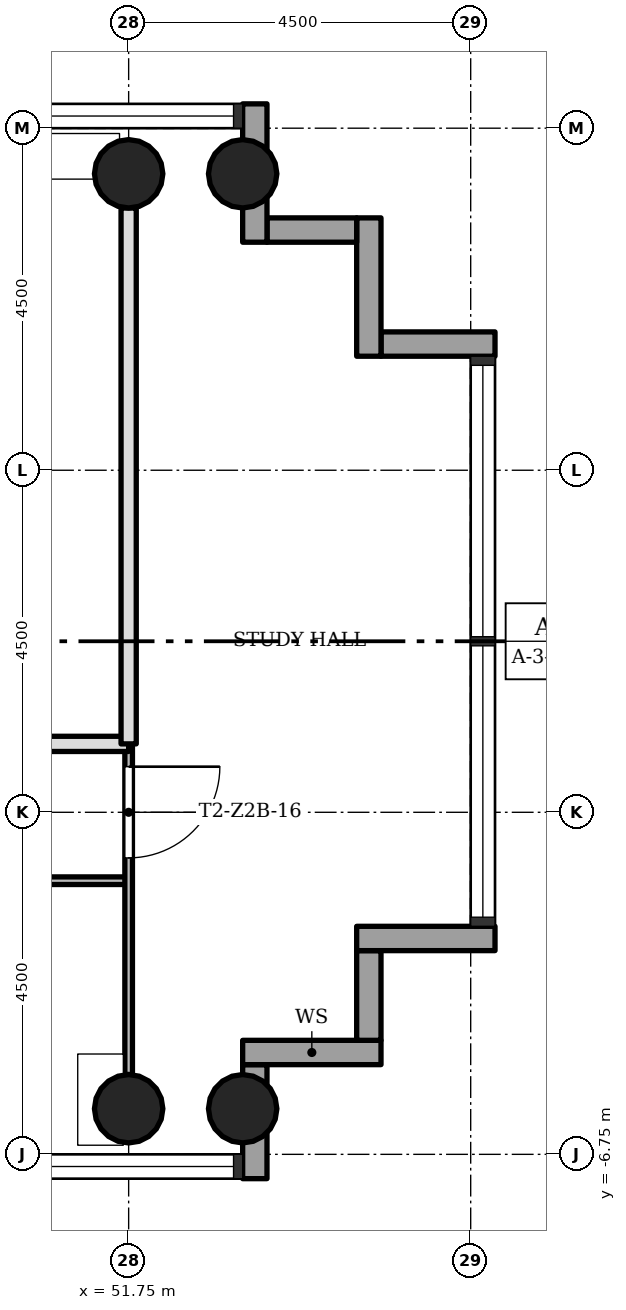
"""IFC4 building model, lengths in metres.
Left out: names, types, materials, properties, quantities, classifications, styles, units other than length and angle.
Written with IfcOpenShell. Run it as: python <this file> out.ifc"""

import sys

from ifc_helpers import new_model, si_unit, direction, frame, frame_2d, origin, origin_2d, place, context, subcontext, project, spatial, rectangle, hollow_circle, extrude, element, fill, save


model = new_model("IFC4")
c1 = context("Model", 3, precision=1e-05, world=origin(), true_north=direction((0.0, 1.0)))
c2 = subcontext(c1, "Body", "Model", "MODEL_VIEW")
j1 = project(units=[si_unit("LENGTHUNIT", "METRE"), si_unit("PLANEANGLEUNIT", "RADIAN")], contexts=[c1])
p1 = place(None, origin())
s1 = spatial("IfcSite", under=j1, at=p1, CompositionType="ELEMENT")
p2 = place(p1, origin())
s2 = spatial("IfcBuilding", under=s1, at=p2, CompositionType="ELEMENT")
p3 = place(p2, frame((0.0, 0.0, 76.6)))
s3 = spatial("IfcBuildingStorey", under=s2, at=p3, CompositionType="ELEMENT", Elevation=76.6)
for number, where, z_axis, x_axis in (
    (1, (51.75, -6.15, 0.0), (0.0, 0.0, 1.0), (1.0, 0.0, 0.0)),
    (2, (51.75, 6.15, 0.0), (0.0, 0.0, 1.0), (1.0, 0.0, 0.0)),
    (3, (53.25, -6.15, 0.0), (0.0, 0.0, 1.0), (1.0, 0.0, 0.0)),
    (4, (53.25, 6.15, 0.0), (0.0, 0.0, 1.0), (1.0, 0.0, 0.0)),
):
    element("IfcColumn", number, at=place(p3, frame(where, z_axis=z_axis, x_axis=x_axis)), inside=s3, PredefinedType="COLUMN", context=c2, shape_type="SweptSolid", body=[
        extrude(hollow_circle(Radius=0.45, WallThickness=0.032, at=origin_2d()), origin(), (0.0, 0.0, 1.0), 3.4),
    ])
p4 = place(p3, frame((53.41, -7.07, -0.3), z_axis=(0.0, 0.0, 1.0), x_axis=(0.0, 1.0, 0.0)))
e5 = element("IfcWall", 5, at=p4, inside=s3, PredefinedType="STANDARD", context=c2, shape_type="SweptSolid", body=[
    extrude(rectangle(XDim=1.5, YDim=0.32, at=frame_2d((0.75, 0.0))), origin(), (0.0, 0.0, 1.0), 3.4),
])
p5 = place(p3, frame((53.25, -5.41, -0.3), z_axis=(0.0, 0.0, 1.0), x_axis=(1.0, 0.0, 0.0)))
e6 = element("IfcWall", 6, at=p5, inside=s3, PredefinedType="STANDARD", context=c2, shape_type="SweptSolid", body=[
    extrude(rectangle(XDim=1.82, YDim=0.32, at=frame_2d((0.91, 0.0))), origin(), (0.0, 0.0, 1.0), 3.4),
])
p6 = place(p3, frame((54.91, -5.25, -0.3), z_axis=(0.0, 0.0, 1.0), x_axis=(0.0, 1.0, 0.0)))
e7 = element("IfcWall", 7, at=p6, inside=s3, PredefinedType="STANDARD", context=c2, shape_type="SweptSolid", body=[
    extrude(rectangle(XDim=1.18, YDim=0.32, at=frame_2d((0.59, 0.0))), origin(), (0.0, 0.0, 1.0), 3.4),
])
p7 = place(p3, frame((54.75, -3.91, -0.3), z_axis=(0.0, 0.0, 1.0), x_axis=(1.0, 0.0, 0.0)))
e8 = element("IfcWall", 8, at=p7, inside=s3, PredefinedType="STANDARD", context=c2, shape_type="SweptSolid", body=[
    extrude(rectangle(XDim=1.82, YDim=0.32, at=frame_2d((0.91, 0.0))), origin(), (0.0, 0.0, 1.0), 3.4),
])
p8 = place(p3, frame((56.57, 3.91, -0.3), z_axis=(0.0, 0.0, 1.0), x_axis=(-1.0, 0.0, 0.0)))
e9 = element("IfcWall", 9, at=p8, inside=s3, PredefinedType="STANDARD", context=c2, shape_type="SweptSolid", body=[
    extrude(rectangle(XDim=1.5, YDim=0.32, at=frame_2d((0.75, 0.0))), origin(), (0.0, 0.0, 1.0), 3.4),
])
p9 = place(p3, frame((54.91, 3.75, -0.3), z_axis=(0.0, 0.0, 1.0), x_axis=(0.0, 1.0, 0.0)))
e10 = element("IfcWall", 10, at=p9, inside=s3, PredefinedType="STANDARD", context=c2, shape_type="SweptSolid", body=[
    extrude(rectangle(XDim=1.82, YDim=0.32, at=frame_2d((0.91, 0.0))), origin(), (0.0, 0.0, 1.0), 3.4),
])
p10 = place(p3, frame((54.75, 5.41, -0.3), z_axis=(0.0, 0.0, 1.0), x_axis=(-1.0, 0.0, 0.0)))
e11 = element("IfcWall", 11, at=p10, inside=s3, PredefinedType="STANDARD", context=c2, shape_type="SweptSolid", body=[
    extrude(rectangle(XDim=1.18, YDim=0.32, at=frame_2d((0.59, 0.0))), origin(), (0.0, 0.0, 1.0), 3.4),
])
p11 = place(p3, frame((53.41, 5.25, -0.3), z_axis=(0.0, 0.0, 1.0), x_axis=(0.0, 1.0, 0.0)))
e12 = element("IfcWall", 12, at=p11, inside=s3, PredefinedType="STANDARD", context=c2, shape_type="SweptSolid", body=[
    extrude(rectangle(XDim=1.82, YDim=0.32, at=frame_2d((0.91, 0.0))), origin(), (0.0, 0.0, 1.0), 3.4),
])
p12 = place(p3, frame((51.75, -3.15, 0.0), z_axis=(0.0, 0.0, 1.0), x_axis=(-1.0, 0.0, 0.0)))
e13 = element("IfcWall", 13, at=p12, inside=s3, PredefinedType="PARTITIONING", context=c2, shape_type="SweptSolid", body=[
    extrude(rectangle(XDim=9.0, YDim=0.1, at=frame_2d((4.5, 0.0))), origin(), (0.0, 0.0, 1.0), 3.0),
])
p13 = place(p12, frame((5.55, 0.0, 0.0)))
e14 = element("IfcOpeningElement", 14, at=p13, cuts=e13, PredefinedType="OPENING", context=c2, shape_type="SweptSolid", body=[
    extrude(rectangle(XDim=0.9, YDim=2.1, at=frame_2d((0.45, 1.05))), frame((0.0, 0.06, 0.0), z_axis=(0.0, -1.0, 0.0), x_axis=(1.0, 0.0, 0.0)), (0.0, 0.0, 1.0), 0.12),
])
p14 = place(p3, frame((51.75, -1.35, 0.0), z_axis=(0.0, 0.0, 1.0), x_axis=(-1.0, 0.0, 0.0)))
e15 = element("IfcWall", 15, at=p14, inside=s3, PredefinedType="SOLIDWALL", context=c2, shape_type="SweptSolid", body=[
    extrude(rectangle(XDim=7.2, YDim=0.2, at=frame_2d((3.6, 0.0))), origin(), (0.0, 0.0, 1.0), 3.0),
])
p15 = place(p14, frame((1.95, 0.0, 0.0)))
e16 = element("IfcOpeningElement", 16, at=p15, cuts=e15, PredefinedType="OPENING", context=c2, shape_type="SweptSolid", body=[
    extrude(rectangle(XDim=0.9, YDim=2.1, at=frame_2d((0.45, 1.05))), frame((0.0, 0.11, 0.0), z_axis=(0.0, -1.0, 0.0), x_axis=(1.0, 0.0, 0.0)), (0.0, 0.0, 1.0), 0.22),
])
p16 = place(p3, frame((51.75, -5.7, 0.0), z_axis=(0.0, 0.0, 1.0), x_axis=(0.0, 1.0, 0.0)))
e17 = element("IfcWall", 17, at=p16, inside=s3, PredefinedType="PARTITIONING", context=c2, shape_type="SweptSolid", body=[
    extrude(rectangle(XDim=4.35, YDim=0.1, at=frame_2d((2.175, 0.0))), origin(), (0.0, 0.0, 1.0), 3.0),
])
p17 = place(p16, frame((2.85, 0.0, 0.0)))
e18 = element("IfcOpeningElement", 18, at=p17, cuts=e17, PredefinedType="OPENING", context=c2, shape_type="SweptSolid", body=[
    extrude(rectangle(XDim=1.2, YDim=2.1, at=frame_2d((0.6, 1.05))), frame((0.0, 0.06, 0.0), z_axis=(0.0, -1.0, 0.0), x_axis=(1.0, 0.0, 0.0)), (0.0, 0.0, 1.0), 0.12),
])
p18 = place(p3, frame((51.75, -1.35, 0.0), z_axis=(0.0, 0.0, 1.0), x_axis=(0.0, 1.0, 0.0)))
e19 = element("IfcWall", 19, at=p18, inside=s3, PredefinedType="SOLIDWALL", context=c2, shape_type="SweptSolid", body=[
    extrude(rectangle(XDim=7.05, YDim=0.2, at=frame_2d((3.525, 0.0))), origin(), (0.0, 0.0, 1.0), 3.0),
])
p19 = place(p17, origin())
e20 = element("IfcDoor", 20, at=p19, inside=s3, OperationType="SINGLE_SWING_RIGHT", PredefinedType="DOOR", context=c2, shape_type="SweptSolid", body=[
    extrude(rectangle(XDim=1.2, YDim=2.1, at=frame_2d((0.6, 1.05))), frame((0.0, 0.025, 0.0), z_axis=(0.0, -1.0, 0.0), x_axis=(1.0, 0.0, 0.0)), (0.0, 0.0, 1.0), 0.05),
])
fill(e18, e20)
save(model, sys.argv[1])
